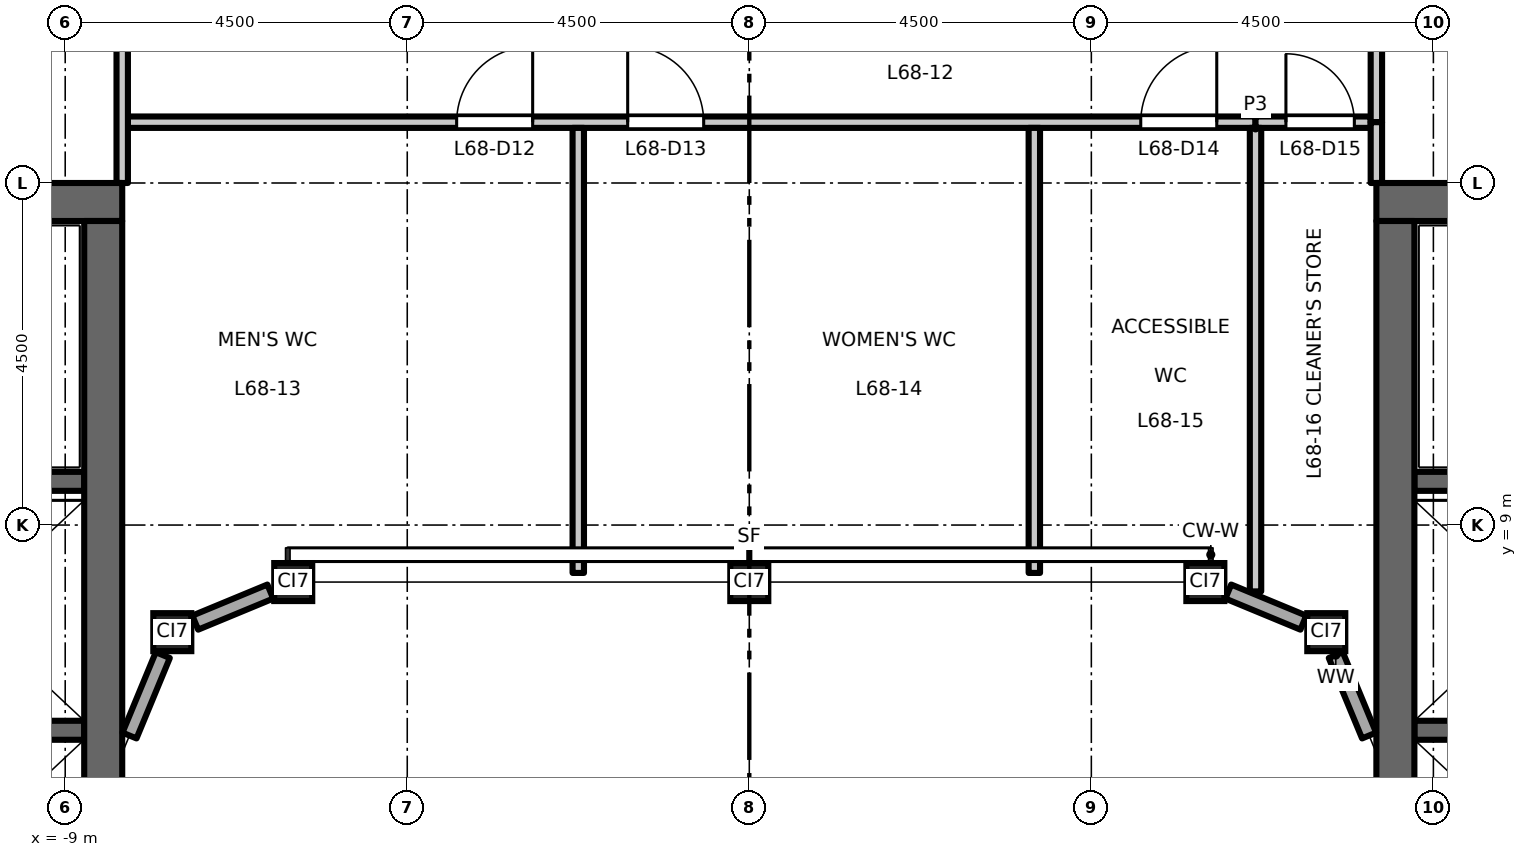
"""IFC4 building model, lengths in metres.
Left out: names, types, materials, properties, quantities, classifications, styles, units other than length and angle.
Written with IfcOpenShell. Run it as: python <this file> out.ifc"""

import sys

from ifc_helpers import new_model, si_unit, direction, frame, frame_2d, origin, origin_2d, place, context, subcontext, project, spatial, rectangle, hollow_rectangle, extrude, element, fill, save


model = new_model("IFC4")
c1 = context("Model", 3, precision=1e-05, world=origin(), true_north=direction((0.0, 1.0)))
c2 = subcontext(c1, "Body", "Model", "MODEL_VIEW")
j1 = project(units=[si_unit("LENGTHUNIT", "METRE"), si_unit("PLANEANGLEUNIT", "RADIAN")], contexts=[c1])
p1 = place(None, origin())
s1 = spatial("IfcSite", under=j1, at=p1, CompositionType="ELEMENT")
p2 = place(p1, origin())
s2 = spatial("IfcBuilding", under=s1, at=p2, CompositionType="ELEMENT")
p3 = place(p2, frame((0.0, 0.0, 316.7)))
s3 = spatial("IfcBuildingStorey", under=s2, at=p3, CompositionType="ELEMENT", Elevation=316.7)
for number, where, z_axis, x_axis in (
    (1, (-7.591, 7.591, 0.0), (0.0, 0.0, 1.0), (1.0, 0.0, 0.0)),
    (2, (-6.0, 8.25, 0.0), (0.0, 0.0, 1.0), (1.0, 0.0, 0.0)),
    (3, (0.0, 8.25, 0.0), (0.0, 0.0, 1.0), (1.0, 0.0, 0.0)),
    (4, (6.0, 8.25, 0.0), (0.0, 0.0, 1.0), (1.0, 0.0, 0.0)),
    (5, (7.591, 7.591, 0.0), (0.0, 0.0, 1.0), (1.0, 0.0, 0.0)),
):
    element("IfcColumn", number, at=place(p3, frame(where, z_axis=z_axis, x_axis=x_axis)), inside=s3, PredefinedType="COLUMN", context=c2, shape_type="SweptSolid", body=[
        extrude(hollow_rectangle(XDim=0.5, YDim=0.5, WallThickness=0.025, at=origin_2d()), origin(), (0.0, 0.0, 1.0), 4.5),
    ])
p4 = place(p3, frame((-8.75, 6.3, 0.0), z_axis=(0.0, 0.0, 1.0), x_axis=(-1.0, 0.0, 0.0)))
e6 = element("IfcWall", 6, at=p4, inside=s3, PredefinedType="SHEAR", context=c2, shape_type="SweptSolid", body=[
    extrude(rectangle(XDim=3.1, YDim=0.25, at=frame_2d((1.55, 0.0))), origin(), (0.0, 0.0, 1.0), 4.35),
])
p5 = place(p3, frame((-8.75, 9.575, 0.0), z_axis=(0.0, 0.0, 1.0), x_axis=(-1.0, 0.0, 0.0)))
e7 = element("IfcWall", 7, at=p5, inside=s3, PredefinedType="SHEAR", context=c2, shape_type="SweptSolid", body=[
    extrude(rectangle(XDim=8.0, YDim=0.25, at=frame_2d((4.0, 0.0))), origin(), (0.0, 0.0, 1.0), 4.35),
])
p6 = place(p5, frame((6.65, 0.0, 0.0)))
e8 = element("IfcOpeningElement", 8, at=p6, cuts=e7, PredefinedType="OPENING", context=c2, shape_type="SweptSolid", body=[
    extrude(rectangle(XDim=1.1, YDim=2.1, at=frame_2d((0.55, 1.05))), frame((0.0, 0.135, 0.0), z_axis=(0.0, -1.0, 0.0), x_axis=(1.0, 0.0, 0.0)), (0.0, 0.0, 1.0), 0.27),
])
p7 = place(p3, frame((-8.25, 13.25, 0.0), z_axis=(0.0, 0.0, 1.0), x_axis=(-1.0, 0.0, 0.0)))
e9 = element("IfcWall", 9, at=p7, inside=s3, PredefinedType="SHEAR", context=c2, shape_type="SweptSolid", body=[
    extrude(rectangle(XDim=9.0, YDim=0.5, at=frame_2d((4.5, 0.0))), origin(), (0.0, 0.0, 1.0), 4.35),
])
p8 = place(p3, frame((-8.5, -13.0, 0.0), z_axis=(0.0, 0.0, 1.0), x_axis=(0.0, 1.0, 0.0)))
e10 = element("IfcWall", 10, at=p8, inside=s3, PredefinedType="SHEAR", context=c2, shape_type="SweptSolid", body=[
    extrude(rectangle(XDim=26.0, YDim=0.5, at=frame_2d((13.0, 0.0))), origin(), (0.0, 0.0, 1.0), 4.35),
])
p9 = place(p3, frame((8.75, 6.3, 0.0), z_axis=(0.0, 0.0, 1.0), x_axis=(1.0, 0.0, 0.0)))
e11 = element("IfcWall", 11, at=p9, inside=s3, PredefinedType="SHEAR", context=c2, shape_type="SweptSolid", body=[
    extrude(rectangle(XDim=3.1, YDim=0.25, at=frame_2d((1.55, 0.0))), origin(), (0.0, 0.0, 1.0), 4.35),
])
p10 = place(p3, frame((8.75, 9.575, 0.0), z_axis=(0.0, 0.0, 1.0), x_axis=(1.0, 0.0, 0.0)))
e12 = element("IfcWall", 12, at=p10, inside=s3, PredefinedType="SHEAR", context=c2, shape_type="SweptSolid", body=[
    extrude(rectangle(XDim=8.0, YDim=0.25, at=frame_2d((4.0, 0.0))), origin(), (0.0, 0.0, 1.0), 4.35),
])
p11 = place(p10, frame((6.65, 0.0, 0.0)))
e13 = element("IfcOpeningElement", 13, at=p11, cuts=e12, PredefinedType="OPENING", context=c2, shape_type="SweptSolid", body=[
    extrude(rectangle(XDim=1.1, YDim=2.1, at=frame_2d((0.55, 1.05))), frame((0.0, 0.135, 0.0), z_axis=(0.0, -1.0, 0.0), x_axis=(1.0, 0.0, 0.0)), (0.0, 0.0, 1.0), 0.27),
])
p12 = place(p3, frame((8.25, 13.25, 0.0), z_axis=(0.0, 0.0, 1.0), x_axis=(1.0, 0.0, 0.0)))
e14 = element("IfcWall", 14, at=p12, inside=s3, PredefinedType="SHEAR", context=c2, shape_type="SweptSolid", body=[
    extrude(rectangle(XDim=9.0, YDim=0.5, at=frame_2d((4.5, 0.0))), origin(), (0.0, 0.0, 1.0), 4.35),
])
p13 = place(p3, frame((8.5, -13.0, 0.0), z_axis=(0.0, 0.0, 1.0), x_axis=(0.0, 1.0, 0.0)))
e15 = element("IfcWall", 15, at=p13, inside=s3, PredefinedType="SHEAR", context=c2, shape_type="SweptSolid", body=[
    extrude(rectangle(XDim=26.0, YDim=0.5, at=frame_2d((13.0, 0.0))), origin(), (0.0, 0.0, 1.0), 4.35),
])
p14 = place(p3, frame((8.154, 6.231, 0.0), z_axis=(0.0, 0.0, 1.0), x_axis=(-0.382571404949, 0.923925927829, 0.0)))
e16 = element("IfcWall", 16, at=p14, inside=s3, PredefinedType="STANDARD", context=c2, shape_type="SweptSolid", body=[
    extrude(rectangle(XDim=1.146, YDim=0.2, at=frame_2d((0.573, 0.0))), origin(), (0.0, 0.0, 1.0), 4.01),
])
for number, where, z_axis, x_axis in (
    (17, (7.289, 7.716, 0.0), (0.0, 0.0, 1.0), (-0.924, 0.383, 0.0)),
    (18, (-6.302, 8.125, 0.0), (0.0, 0.0, 1.0), (-0.924, -0.383, 0.0)),
):
    element("IfcWall", number, at=place(p3, frame(where, z_axis=z_axis, x_axis=x_axis)), inside=s3, PredefinedType="STANDARD", context=c2, shape_type="SweptSolid", body=[
        extrude(rectangle(XDim=1.069, YDim=0.2, at=frame_2d((0.534, 0.0))), origin(), (0.0, 0.0, 1.0), 4.01),
    ])
p15 = place(p3, frame((-7.716, 7.289, 0.0), z_axis=(0.0, 0.0, 1.0), x_axis=(-0.382571404949, -0.923925927829, 0.0)))
e19 = element("IfcWall", 19, at=p15, inside=s3, PredefinedType="STANDARD", context=c2, shape_type="SweptSolid", body=[
    extrude(rectangle(XDim=1.146, YDim=0.2, at=frame_2d((0.573, 0.0))), origin(), (0.0, 0.0, 1.0), 4.01),
])
p16 = place(p3, frame((-8.175, 14.3, 0.0), z_axis=(0.0, 0.0, 1.0), x_axis=(1.0, 0.0, 0.0)))
e20 = element("IfcWall", 20, at=p16, inside=s3, PredefinedType="PARTITIONING", context=c2, shape_type="SweptSolid", body=[
    extrude(rectangle(XDim=14.835, YDim=0.15, at=frame_2d((7.417, 0.0))), origin(), (0.0, 0.0, 1.0), 4.35),
])
p17 = place(p16, frame((4.325, 0.0, 0.0)))
e21 = element("IfcOpeningElement", 21, at=p17, cuts=e20, PredefinedType="OPENING", context=c2, shape_type="SweptSolid", body=[
    extrude(rectangle(XDim=1.0, YDim=2.1, at=frame_2d((0.5, 1.05))), frame((0.0, 0.085, 0.0), z_axis=(0.0, -1.0, 0.0), x_axis=(1.0, 0.0, 0.0)), (0.0, 0.0, 1.0), 0.17),
])
p18 = place(p16, frame((6.575, 0.0, 0.0)))
e22 = element("IfcOpeningElement", 22, at=p18, cuts=e20, PredefinedType="OPENING", context=c2, shape_type="SweptSolid", body=[
    extrude(rectangle(XDim=1.0, YDim=2.1, at=frame_2d((0.5, 1.05))), frame((0.0, 0.085, 0.0), z_axis=(0.0, -1.0, 0.0), x_axis=(1.0, 0.0, 0.0)), (0.0, 0.0, 1.0), 0.17),
])
p19 = place(p16, frame((13.325, 0.0, 0.0)))
e23 = element("IfcOpeningElement", 23, at=p19, cuts=e20, PredefinedType="OPENING", context=c2, shape_type="SweptSolid", body=[
    extrude(rectangle(XDim=1.0, YDim=2.1, at=frame_2d((0.5, 1.05))), frame((0.0, 0.085, 0.0), z_axis=(0.0, -1.0, 0.0), x_axis=(1.0, 0.0, 0.0)), (0.0, 0.0, 1.0), 0.17),
])
p20 = place(p3, frame((6.66, 14.3, 0.0), z_axis=(0.0, 0.0, 1.0), x_axis=(1.0, 0.0, 0.0)))
e24 = element("IfcWall", 24, at=p20, inside=s3, PredefinedType="PARTITIONING", context=c2, shape_type="SweptSolid", body=[
    extrude(rectangle(XDim=1.515, YDim=0.15, at=frame_2d((0.758, 0.0))), origin(), (0.0, 0.0, 1.0), 4.35),
])
p21 = place(p20, frame((0.4, 0.0, 0.0)))
e25 = element("IfcOpeningElement", 25, at=p21, cuts=e24, PredefinedType="OPENING", context=c2, shape_type="SweptSolid", body=[
    extrude(rectangle(XDim=0.9, YDim=2.1, at=frame_2d((0.45, 1.05))), frame((0.0, 0.085, 0.0), z_axis=(0.0, -1.0, 0.0), x_axis=(1.0, 0.0, 0.0)), (0.0, 0.0, 1.0), 0.17),
])
p22 = place(p3, frame((-8.25, 13.5, 0.0), z_axis=(0.0, 0.0, 1.0), x_axis=(0.0, 1.0, 0.0)))
e26 = element("IfcWall", 26, at=p22, inside=s3, PredefinedType="PARTITIONING", context=c2, shape_type="SweptSolid", body=[
    extrude(rectangle(XDim=2.925, YDim=0.15, at=frame_2d((1.462, 0.0))), origin(), (0.0, 0.0, 1.0), 4.35),
])
for number, where, z_axis, x_axis in (
    (27, (-2.25, 8.37, 0.0), (0.0, 0.0, 1.0), (0.0, 1.0, 0.0)),
    (28, (3.75, 8.37, 0.0), (0.0, 0.0, 1.0), (0.0, 1.0, 0.0)),
):
    element("IfcWall", number, at=place(p3, frame(where, z_axis=z_axis, x_axis=x_axis)), inside=s3, PredefinedType="PARTITIONING", context=c2, shape_type="SweptSolid", body=[
        extrude(rectangle(XDim=5.855, YDim=0.15, at=frame_2d((2.927, 0.0))), origin(), (0.0, 0.0, 1.0), 4.35),
    ])
p23 = place(p3, frame((6.66, 8.127, 0.0), z_axis=(0.0, 0.0, 1.0), x_axis=(0.0, 1.0, 0.0)))
e29 = element("IfcWall", 29, at=p23, inside=s3, PredefinedType="PARTITIONING", context=c2, shape_type="SweptSolid", body=[
    extrude(rectangle(XDim=6.098, YDim=0.15, at=frame_2d((3.049, 0.0))), origin(), (0.0, 0.0, 1.0), 4.35),
])
p24 = place(p3, frame((8.25, 14.3, 0.0), z_axis=(0.0, 0.0, 1.0), x_axis=(0.0, 1.0, 0.0)))
e30 = element("IfcWall", 30, at=p24, inside=s3, PredefinedType="PARTITIONING", context=c2, shape_type="SweptSolid", body=[
    extrude(rectangle(XDim=2.125, YDim=0.15, at=frame_2d((1.062, 0.0))), origin(), (0.0, 0.0, 1.0), 4.35),
])
p25 = place(p3, frame((8.25, 13.5, 0.0), z_axis=(0.0, 0.0, 1.0), x_axis=(0.0, 1.0, 0.0)))
e31 = element("IfcWall", 31, at=p25, inside=s3, PredefinedType="PARTITIONING", context=c2, shape_type="SweptSolid", body=[
    extrude(rectangle(XDim=0.8, YDim=0.15, at=frame_2d((0.4, 0.0))), origin(), (0.0, 0.0, 1.0), 4.35),
])
p26 = place(p17, origin())
e32 = element("IfcDoor", 32, at=p26, inside=s3, OperationType="SINGLE_SWING_RIGHT", PredefinedType="DOOR", context=c2, shape_type="SweptSolid", body=[
    extrude(rectangle(XDim=1.0, YDim=2.1, at=frame_2d((0.5, 1.05))), frame((0.0, 0.025, 0.0), z_axis=(0.0, -1.0, 0.0), x_axis=(1.0, 0.0, 0.0)), (0.0, 0.0, 1.0), 0.05),
])
fill(e21, e32)
p27 = place(p18, origin())
e33 = element("IfcDoor", 33, at=p27, inside=s3, OperationType="SINGLE_SWING_LEFT", PredefinedType="DOOR", context=c2, shape_type="SweptSolid", body=[
    extrude(rectangle(XDim=1.0, YDim=2.1, at=frame_2d((0.5, 1.05))), frame((0.0, 0.025, 0.0), z_axis=(0.0, -1.0, 0.0), x_axis=(1.0, 0.0, 0.0)), (0.0, 0.0, 1.0), 0.05),
])
fill(e22, e33)
p28 = place(p19, origin())
e34 = element("IfcDoor", 34, at=p28, inside=s3, OperationType="SINGLE_SWING_RIGHT", PredefinedType="DOOR", context=c2, shape_type="SweptSolid", body=[
    extrude(rectangle(XDim=1.0, YDim=2.1, at=frame_2d((0.5, 1.05))), frame((0.0, 0.025, 0.0), z_axis=(0.0, -1.0, 0.0), x_axis=(1.0, 0.0, 0.0)), (0.0, 0.0, 1.0), 0.05),
])
fill(e23, e34)
p29 = place(p21, origin())
e35 = element("IfcDoor", 35, at=p29, inside=s3, OperationType="SINGLE_SWING_LEFT", PredefinedType="DOOR", context=c2, shape_type="SweptSolid", body=[
    extrude(rectangle(XDim=0.9, YDim=2.1, at=frame_2d((0.45, 1.05))), frame((0.0, 0.025, 0.0), z_axis=(0.0, -1.0, 0.0), x_axis=(1.0, 0.0, 0.0)), (0.0, 0.0, 1.0), 0.05),
])
fill(e25, e35)
save(model, sys.argv[1])
